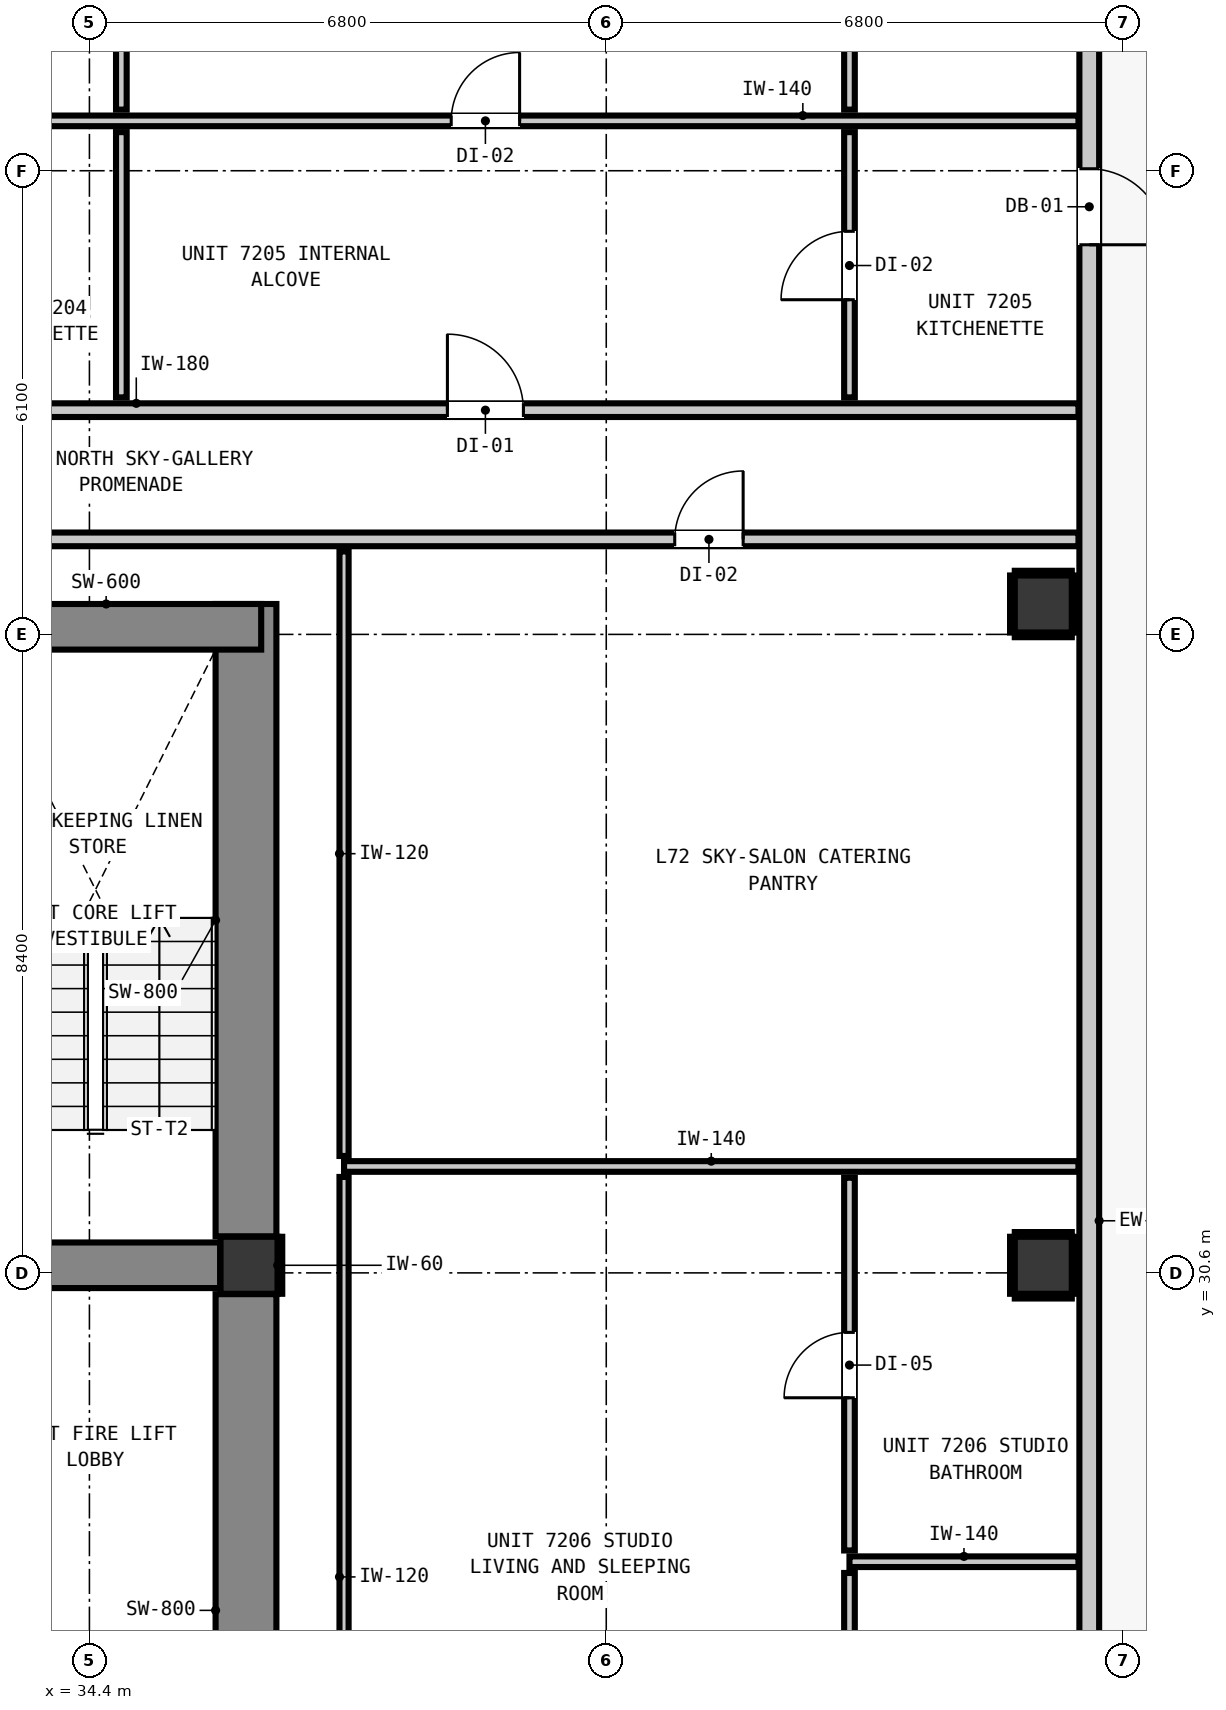
"""IFC4 building model, lengths in metres.
Left out: names, types, materials, properties, quantities, classifications, styles, units other than length and angle.
Written with IfcOpenShell. Run it as: python <this file> out.ifc"""

import sys

from ifc_helpers import new_model, si_unit, direction, frame, frame_2d, origin, origin_2d, place, context, subcontext, project, spatial, rectangle, extrude, element, fill, save


model = new_model("IFC4")
c1 = context("Model", 3, precision=1e-05, world=origin(), true_north=direction((0.0, 1.0)))
c2 = subcontext(c1, "Body", "Model", "MODEL_VIEW")
j1 = project(units=[si_unit("LENGTHUNIT", "METRE"), si_unit("PLANEANGLEUNIT", "RADIAN")], contexts=[c1])
p1 = place(None, origin())
s1 = spatial("IfcSite", under=j1, at=p1, CompositionType="ELEMENT")
p2 = place(p1, origin())
s2 = spatial("IfcBuilding", under=s1, at=p2, CompositionType="ELEMENT")
p3 = place(p2, frame((0.0, 0.0, 247.88)))
s3 = spatial("IfcBuildingStorey", under=s2, at=p3, CompositionType="ELEMENT", Elevation=247.88)
p4 = place(p3, frame((36.5, 30.7, 0.0), z_axis=(0.0, 0.0, 1.0), x_axis=(1.0, 0.0, 0.0)))
e1 = element("IfcColumn", 1, at=p4, inside=s3, PredefinedType="COLUMN", context=c2, shape_type="SweptSolid", body=[
    extrude(rectangle(XDim=0.75, YDim=0.75, at=origin_2d()), origin(), (0.0, 0.0, 1.0), 3.32),
])
p5 = place(p3, frame((36.46, 22.0, 0.0), z_axis=(0.0, 0.0, 1.0), x_axis=(0.0, 1.0, 0.0)))
e2 = element("IfcWall", 2, at=p5, inside=s3, PredefinedType="SHEAR", context=c2, shape_type="SweptSolid", body=[
    extrude(rectangle(XDim=8.32, YDim=0.8, at=frame_2d((4.16, 0.0))), origin(), (0.0, 0.0, 1.0), 3.32),
])
p6 = place(p3, frame((36.46, 31.08, 0.0), z_axis=(0.0, 0.0, 1.0), x_axis=(0.0, 1.0, 0.0)))
e3 = element("IfcWall", 3, at=p6, inside=s3, PredefinedType="SHEAR", context=c2, shape_type="SweptSolid", body=[
    extrude(rectangle(XDim=8.32, YDim=0.8, at=frame_2d((4.16, 0.0))), origin(), (0.0, 0.0, 1.0), 3.32),
])
p7 = place(p3, frame((32.58, 39.1, 0.0), z_axis=(0.0, 0.0, 1.0), x_axis=(1.0, 0.0, 0.0)))
e4 = element("IfcWall", 4, at=p7, inside=s3, PredefinedType="SHEAR", context=c2, shape_type="SweptSolid", body=[
    extrude(rectangle(XDim=4.08, YDim=0.6, at=frame_2d((2.04, 0.0))), origin(), (0.0, 0.0, 1.0), 3.32),
])
p8 = place(p3, frame((32.58, 30.7, 0.0), z_axis=(0.0, 0.0, 1.0), x_axis=(1.0, 0.0, 0.0)))
e5 = element("IfcWall", 5, at=p8, inside=s3, PredefinedType="SHEAR", context=c2, shape_type="SweptSolid", body=[
    extrude(rectangle(XDim=3.54, YDim=0.6, at=frame_2d((1.77, 0.0))), origin(), (0.0, 0.0, 1.0), 3.32),
])
for number, where, z_axis, x_axis in (
    (6, (46.95, 30.7, 0.0), (0.0, 0.0, 1.0), (1.0, 0.0, 0.0)),
    (7, (46.95, 39.4, 0.0), (0.0, 0.0, 1.0), (1.0, 0.0, 0.0)),
):
    element("IfcColumn", number, at=place(p3, frame(where, z_axis=z_axis, x_axis=x_axis)), inside=s3, PredefinedType="COLUMN", context=c2, shape_type="SweptSolid", body=[
        extrude(rectangle(XDim=0.75, YDim=0.75, at=origin_2d()), origin(), (0.0, 0.0, 1.0), 2.9),
    ])
p9 = place(p3, frame((47.555, 48.855, 0.0), z_axis=(0.0, 0.0, 1.0), x_axis=(0.0, -1.0, 0.0)))
e8 = element("IfcWall", 8, at=p9, inside=s3, PredefinedType="STANDARD", context=c2, shape_type="SweptSolid", body=[
    extrude(rectangle(XDim=30.31, YDim=0.26, at=frame_2d((15.155, 0.0))), origin(), (0.0, 0.0, 1.0), 2.9),
])
p10 = place(p9, frame((3.729, 0.0, 0.0)))
e9 = element("IfcOpeningElement", 9, at=p10, cuts=e8, PredefinedType="OPENING", context=c2, shape_type="SweptSolid", body=[
    extrude(rectangle(XDim=1.0, YDim=2.15, at=frame_2d((0.5, 1.075))), frame((0.0, 0.14, 0.0), z_axis=(0.0, -1.0, 0.0), x_axis=(1.0, 0.0, 0.0)), (0.0, 0.0, 1.0), 0.28),
])
p11 = place(p3, frame((10.787, 40.25, 0.0), z_axis=(0.0, 0.0, 1.0), x_axis=(1.0, 0.0, 0.0)))
e10 = element("IfcWall", 10, at=p11, inside=s3, PredefinedType="PARTITIONING", context=c2, shape_type="SweptSolid", body=[
    extrude(rectangle(XDim=36.626, YDim=0.18, at=frame_2d((18.313, 0.0))), origin(), (0.0, 0.0, 1.0), 2.9),
])
p12 = place(p11, frame((6.648, 0.0, 0.0)))
e11 = element("IfcOpeningElement", 11, at=p12, cuts=e10, PredefinedType="OPENING", context=c2, shape_type="SweptSolid", body=[
    extrude(rectangle(XDim=1.4, YDim=2.15, at=frame_2d((0.7, 1.075))), frame((0.0, 0.1, 0.0), z_axis=(0.0, -1.0, 0.0), x_axis=(1.0, 0.0, 0.0)), (0.0, 0.0, 1.0), 0.2),
])
p13 = place(p11, frame((31.314, 0.0, 0.0)))
e12 = element("IfcOpeningElement", 12, at=p13, cuts=e10, PredefinedType="OPENING", context=c2, shape_type="SweptSolid", body=[
    extrude(rectangle(XDim=0.9, YDim=2.1, at=frame_2d((0.45, 1.05))), frame((0.0, 0.1, 0.0), z_axis=(0.0, -1.0, 0.0), x_axis=(1.0, 0.0, 0.0)), (0.0, 0.0, 1.0), 0.2),
])
p14 = place(p3, frame((10.787, 41.95, 0.0), z_axis=(0.0, 0.0, 1.0), x_axis=(1.0, 0.0, 0.0)))
e13 = element("IfcWall", 13, at=p14, inside=s3, PredefinedType="PARTITIONING", context=c2, shape_type="SweptSolid", body=[
    extrude(rectangle(XDim=36.626, YDim=0.18, at=frame_2d((18.313, 0.0))), origin(), (0.0, 0.0, 1.0), 2.9),
])
p15 = place(p14, frame((3.397, 0.0, 0.0)))
e14 = element("IfcOpeningElement", 14, at=p15, cuts=e13, PredefinedType="OPENING", context=c2, shape_type="SweptSolid", body=[
    extrude(rectangle(XDim=1.0, YDim=2.15, at=frame_2d((0.5, 1.075))), frame((0.0, 0.1, 0.0), z_axis=(0.0, -1.0, 0.0), x_axis=(1.0, 0.0, 0.0)), (0.0, 0.0, 1.0), 0.2),
])
p16 = place(p14, frame((10.773, 0.0, 0.0)))
e15 = element("IfcOpeningElement", 15, at=p16, cuts=e13, PredefinedType="OPENING", context=c2, shape_type="SweptSolid", body=[
    extrude(rectangle(XDim=1.0, YDim=2.15, at=frame_2d((0.5, 1.075))), frame((0.0, 0.1, 0.0), z_axis=(0.0, -1.0, 0.0), x_axis=(1.0, 0.0, 0.0)), (0.0, 0.0, 1.0), 0.2),
])
p17 = place(p14, frame((19.136, 0.0, 0.0)))
e16 = element("IfcOpeningElement", 16, at=p17, cuts=e13, PredefinedType="OPENING", context=c2, shape_type="SweptSolid", body=[
    extrude(rectangle(XDim=1.0, YDim=2.15, at=frame_2d((0.5, 1.075))), frame((0.0, 0.1, 0.0), z_axis=(0.0, -1.0, 0.0), x_axis=(1.0, 0.0, 0.0)), (0.0, 0.0, 1.0), 0.2),
])
p18 = place(p14, frame((28.323, 0.0, 0.0)))
e17 = element("IfcOpeningElement", 17, at=p18, cuts=e13, PredefinedType="OPENING", context=c2, shape_type="SweptSolid", body=[
    extrude(rectangle(XDim=1.0, YDim=2.15, at=frame_2d((0.5, 1.075))), frame((0.0, 0.1, 0.0), z_axis=(0.0, -1.0, 0.0), x_axis=(1.0, 0.0, 0.0)), (0.0, 0.0, 1.0), 0.2),
])
p19 = place(p3, frame((44.4, 26.8, 0.0), z_axis=(0.0, 0.0, 1.0), x_axis=(1.0, 0.0, 0.0)))
e18 = element("IfcWall", 18, at=p19, inside=s3, PredefinedType="PARTITIONING", context=c2, shape_type="SweptSolid", body=[
    extrude(rectangle(XDim=3.013, YDim=0.14, at=frame_2d((1.507, 0.0))), origin(), (0.0, 0.0, 1.0), 2.9),
])
p20 = place(p3, frame((37.75, 32.0, 0.0), z_axis=(0.0, 0.0, 1.0), x_axis=(1.0, 0.0, 0.0)))
e19 = element("IfcWall", 19, at=p20, inside=s3, PredefinedType="PARTITIONING", context=c2, shape_type="SweptSolid", body=[
    extrude(rectangle(XDim=9.663, YDim=0.14, at=frame_2d((4.832, 0.0))), origin(), (0.0, 0.0, 1.0), 2.9),
])
p21 = place(p3, frame((32.046, 45.756, 0.0), z_axis=(0.0, 0.0, 1.0), x_axis=(1.0, 0.0, 0.0)))
e20 = element("IfcWall", 20, at=p21, inside=s3, PredefinedType="PARTITIONING", context=c2, shape_type="SweptSolid", body=[
    extrude(rectangle(XDim=15.367, YDim=0.14, at=frame_2d((7.684, 0.0))), origin(), (0.0, 0.0, 1.0), 2.9),
])
p22 = place(p21, frame((7.114, 0.0, 0.0)))
e21 = element("IfcOpeningElement", 21, at=p22, cuts=e20, PredefinedType="OPENING", context=c2, shape_type="SweptSolid", body=[
    extrude(rectangle(XDim=0.9, YDim=2.1, at=frame_2d((0.45, 1.05))), frame((0.0, 0.08, 0.0), z_axis=(0.0, -1.0, 0.0), x_axis=(1.0, 0.0, 0.0)), (0.0, 0.0, 1.0), 0.16),
])
p23 = place(p3, frame((34.82, 42.118, 0.0), z_axis=(0.0, 0.0, 1.0), x_axis=(0.0, 1.0, 0.0)))
e22 = element("IfcWall", 22, at=p23, inside=s3, PredefinedType="PARTITIONING", context=c2, shape_type="SweptSolid", body=[
    extrude(rectangle(XDim=3.49, YDim=0.14, at=frame_2d((1.745, 0.0))), origin(), (0.0, 0.0, 1.0), 2.9),
])
p24 = place(p3, frame((34.82, 45.904, 0.0), z_axis=(0.0, 0.0, 1.0), x_axis=(0.0, 1.0, 0.0)))
e23 = element("IfcWall", 23, at=p24, inside=s3, PredefinedType="PARTITIONING", context=c2, shape_type="SweptSolid", body=[
    extrude(rectangle(XDim=4.909, YDim=0.14, at=frame_2d((2.455, 0.0))), origin(), (0.0, 0.0, 1.0), 2.9),
])
p25 = place(p3, frame((44.4, 21.348, 0.0), z_axis=(0.0, 0.0, 1.0), x_axis=(0.0, 1.0, 0.0)))
e24 = element("IfcWall", 24, at=p25, inside=s3, PredefinedType="PARTITIONING", context=c2, shape_type="SweptSolid", body=[
    extrude(rectangle(XDim=5.304, YDim=0.14, at=frame_2d((2.652, 0.0))), origin(), (0.0, 0.0, 1.0), 2.9),
])
p26 = place(p25, frame((2.19, 0.0, 0.0)))
e25 = element("IfcOpeningElement", 25, at=p26, cuts=e24, PredefinedType="OPENING", context=c2, shape_type="SweptSolid", body=[
    extrude(rectangle(XDim=0.9, YDim=2.1, at=frame_2d((0.45, 1.05))), frame((0.0, 0.08, 0.0), z_axis=(0.0, -1.0, 0.0), x_axis=(1.0, 0.0, 0.0)), (0.0, 0.0, 1.0), 0.16),
])
p27 = place(p3, frame((44.4, 26.948, 0.0), z_axis=(0.0, 0.0, 1.0), x_axis=(0.0, 1.0, 0.0)))
e26 = element("IfcWall", 26, at=p27, inside=s3, PredefinedType="PARTITIONING", context=c2, shape_type="SweptSolid", body=[
    extrude(rectangle(XDim=4.904, YDim=0.14, at=frame_2d((2.452, 0.0))), origin(), (0.0, 0.0, 1.0), 2.9),
])
p28 = place(p27, frame((2.009, 0.0, 0.0)))
e27 = element("IfcOpeningElement", 27, at=p28, cuts=e26, PredefinedType="OPENING", context=c2, shape_type="SweptSolid", body=[
    extrude(rectangle(XDim=0.86, YDim=2.02, at=frame_2d((0.43, 1.01))), frame((0.0, 0.08, 0.0), z_axis=(0.0, -1.0, 0.0), x_axis=(1.0, 0.0, 0.0)), (0.0, 0.0, 1.0), 0.16),
])
p29 = place(p3, frame((44.4, 42.118, 0.0), z_axis=(0.0, 0.0, 1.0), x_axis=(0.0, 1.0, 0.0)))
e28 = element("IfcWall", 28, at=p29, inside=s3, PredefinedType="PARTITIONING", context=c2, shape_type="SweptSolid", body=[
    extrude(rectangle(XDim=3.49, YDim=0.14, at=frame_2d((1.745, 0.0))), origin(), (0.0, 0.0, 1.0), 2.9),
])
p30 = place(p29, frame((1.285, 0.0, 0.0)))
e29 = element("IfcOpeningElement", 29, at=p30, cuts=e28, PredefinedType="OPENING", context=c2, shape_type="SweptSolid", body=[
    extrude(rectangle(XDim=0.9, YDim=2.1, at=frame_2d((0.45, 1.05))), frame((0.0, 0.08, 0.0), z_axis=(0.0, -1.0, 0.0), x_axis=(1.0, 0.0, 0.0)), (0.0, 0.0, 1.0), 0.16),
])
p31 = place(p3, frame((44.4, 45.904, 0.0), z_axis=(0.0, 0.0, 1.0), x_axis=(0.0, 1.0, 0.0)))
e30 = element("IfcWall", 30, at=p31, inside=s3, PredefinedType="PARTITIONING", context=c2, shape_type="SweptSolid", body=[
    extrude(rectangle(XDim=4.909, YDim=0.14, at=frame_2d((2.455, 0.0))), origin(), (0.0, 0.0, 1.0), 2.9),
])
p32 = place(p31, frame((1.944, 0.0, 0.0)))
e31 = element("IfcOpeningElement", 31, at=p32, cuts=e30, PredefinedType="OPENING", context=c2, shape_type="SweptSolid", body=[
    extrude(rectangle(XDim=0.86, YDim=2.02, at=frame_2d((0.43, 1.01))), frame((0.0, 0.08, 0.0), z_axis=(0.0, -1.0, 0.0), x_axis=(1.0, 0.0, 0.0)), (0.0, 0.0, 1.0), 0.16),
])
p33 = place(p3, frame((37.75, 21.338, 0.0), z_axis=(0.0, 0.0, 1.0), x_axis=(0.0, 1.0, 0.0)))
e32 = element("IfcWall", 32, at=p33, inside=s3, PredefinedType="PARTITIONING", context=c2, shape_type="SweptSolid", body=[
    extrude(rectangle(XDim=10.524, YDim=0.12, at=frame_2d((5.262, 0.0))), origin(), (0.0, 0.0, 1.0), 2.9),
])
p34 = place(p3, frame((37.75, 32.138, 0.0), z_axis=(0.0, 0.0, 1.0), x_axis=(0.0, 1.0, 0.0)))
e33 = element("IfcWall", 33, at=p34, inside=s3, PredefinedType="PARTITIONING", context=c2, shape_type="SweptSolid", body=[
    extrude(rectangle(XDim=7.954, YDim=0.12, at=frame_2d((3.977, 0.0))), origin(), (0.0, 0.0, 1.0), 2.9),
])
for number, where, z_axis, x_axis in (
    (34, (36.907, 30.325, 0.0), (0.0, 0.0, 1.0), (0.0, 1.0, 0.0)),
    (35, (46.575, 30.293, 0.0), (0.0, 0.0, 1.0), (1.0, 0.0, 0.0)),
    (36, (46.575, 31.107, 0.0), (0.0, 0.0, 1.0), (1.0, 0.0, 0.0)),
):
    element("IfcWall", number, at=place(p3, frame(where, z_axis=z_axis, x_axis=x_axis)), inside=s3, PredefinedType="PARTITIONING", context=c2, shape_type="SweptSolid", body=[
        extrude(rectangle(XDim=0.75, YDim=0.06, at=frame_2d((0.375, 0.0))), origin(), (0.0, 0.0, 1.0), 0.905),
    ])
for number, where, z_axis, x_axis in (
    (37, (46.543, 30.325, 0.0), (0.0, 0.0, 1.0), (0.0, 1.0, 0.0)),
    (38, (47.357, 30.325, 0.0), (0.0, 0.0, 1.0), (0.0, 1.0, 0.0)),
):
    element("IfcWall", number, at=place(p3, frame(where, z_axis=z_axis, x_axis=x_axis)), inside=s3, PredefinedType="PARTITIONING", context=c2, shape_type="SweptSolid", body=[
        extrude(rectangle(XDim=0.75, YDim=0.06, at=frame_2d((0.375, 0.0))), origin(), (0.0, 0.0, 1.0), 1.45),
    ])
for number, where, z_axis, x_axis in (
    (39, (46.575, 38.993, 0.0), (0.0, 0.0, 1.0), (1.0, 0.0, 0.0)),
    (40, (46.575, 39.807, 0.0), (0.0, 0.0, 1.0), (1.0, 0.0, 0.0)),
):
    element("IfcWall", number, at=place(p3, frame(where, z_axis=z_axis, x_axis=x_axis)), inside=s3, PredefinedType="PARTITIONING", context=c2, shape_type="SweptSolid", body=[
        extrude(rectangle(XDim=0.75, YDim=0.06, at=frame_2d((0.375, 0.0))), origin(), (0.0, 0.0, 1.0), 0.905),
    ])
for number, where, z_axis, x_axis in (
    (41, (46.543, 39.025, 0.0), (0.0, 0.0, 1.0), (0.0, 1.0, 0.0)),
    (42, (47.357, 39.025, 0.0), (0.0, 0.0, 1.0), (0.0, 1.0, 0.0)),
):
    element("IfcWall", number, at=place(p3, frame(where, z_axis=z_axis, x_axis=x_axis)), inside=s3, PredefinedType="PARTITIONING", context=c2, shape_type="SweptSolid", body=[
        extrude(rectangle(XDim=0.75, YDim=0.06, at=frame_2d((0.375, 0.0))), origin(), (0.0, 0.0, 1.0), 1.45),
    ])
p35 = place(p10, origin())
e43 = element("IfcDoor", 43, at=p35, inside=s3, OperationType="SINGLE_SWING_RIGHT", PredefinedType="DOOR", context=c2, shape_type="SweptSolid", body=[
    extrude(rectangle(XDim=1.0, YDim=2.15, at=frame_2d((0.5, 1.075))), frame((0.0, 0.025, 0.0), z_axis=(0.0, -1.0, 0.0), x_axis=(1.0, 0.0, 0.0)), (0.0, 0.0, 1.0), 0.05),
])
fill(e9, e43)
p36 = place(p18, origin())
e44 = element("IfcDoor", 44, at=p36, inside=s3, OperationType="SINGLE_SWING_LEFT", PredefinedType="DOOR", context=c2, shape_type="SweptSolid", body=[
    extrude(rectangle(XDim=1.0, YDim=2.15, at=frame_2d((0.5, 1.075))), frame((0.0, 0.025, 0.0), z_axis=(0.0, -1.0, 0.0), x_axis=(1.0, 0.0, 0.0)), (0.0, 0.0, 1.0), 0.05),
])
fill(e17, e44)
p37 = place(p22, origin())
e45 = element("IfcDoor", 45, at=p37, inside=s3, OperationType="SINGLE_SWING_RIGHT", PredefinedType="DOOR", context=c2, shape_type="SweptSolid", body=[
    extrude(rectangle(XDim=0.9, YDim=2.1, at=frame_2d((0.45, 1.05))), frame((0.0, 0.025, 0.0), z_axis=(0.0, -1.0, 0.0), x_axis=(1.0, 0.0, 0.0)), (0.0, 0.0, 1.0), 0.05),
])
fill(e21, e45)
p38 = place(p30, origin())
e46 = element("IfcDoor", 46, at=p38, inside=s3, OperationType="SINGLE_SWING_LEFT", PredefinedType="DOOR", context=c2, shape_type="SweptSolid", body=[
    extrude(rectangle(XDim=0.9, YDim=2.1, at=frame_2d((0.45, 1.05))), frame((0.0, 0.025, 0.0), z_axis=(0.0, -1.0, 0.0), x_axis=(1.0, 0.0, 0.0)), (0.0, 0.0, 1.0), 0.05),
])
fill(e29, e46)
p39 = place(p28, origin())
e47 = element("IfcDoor", 47, at=p39, inside=s3, OperationType="SINGLE_SWING_LEFT", PredefinedType="DOOR", context=c2, shape_type="SweptSolid", body=[
    extrude(rectangle(XDim=0.86, YDim=2.02, at=frame_2d((0.43, 1.01))), frame((0.0, 0.025, 0.0), z_axis=(0.0, -1.0, 0.0), x_axis=(1.0, 0.0, 0.0)), (0.0, 0.0, 1.0), 0.05),
])
fill(e27, e47)
p40 = place(p13, origin())
e48 = element("IfcDoor", 48, at=p40, inside=s3, OperationType="SINGLE_SWING_RIGHT", PredefinedType="DOOR", context=c2, shape_type="SweptSolid", body=[
    extrude(rectangle(XDim=0.9, YDim=2.1, at=frame_2d((0.45, 1.05))), frame((0.0, 0.025, 0.0), z_axis=(0.0, -1.0, 0.0), x_axis=(1.0, 0.0, 0.0)), (0.0, 0.0, 1.0), 0.05),
])
fill(e12, e48)
save(model, sys.argv[1])
